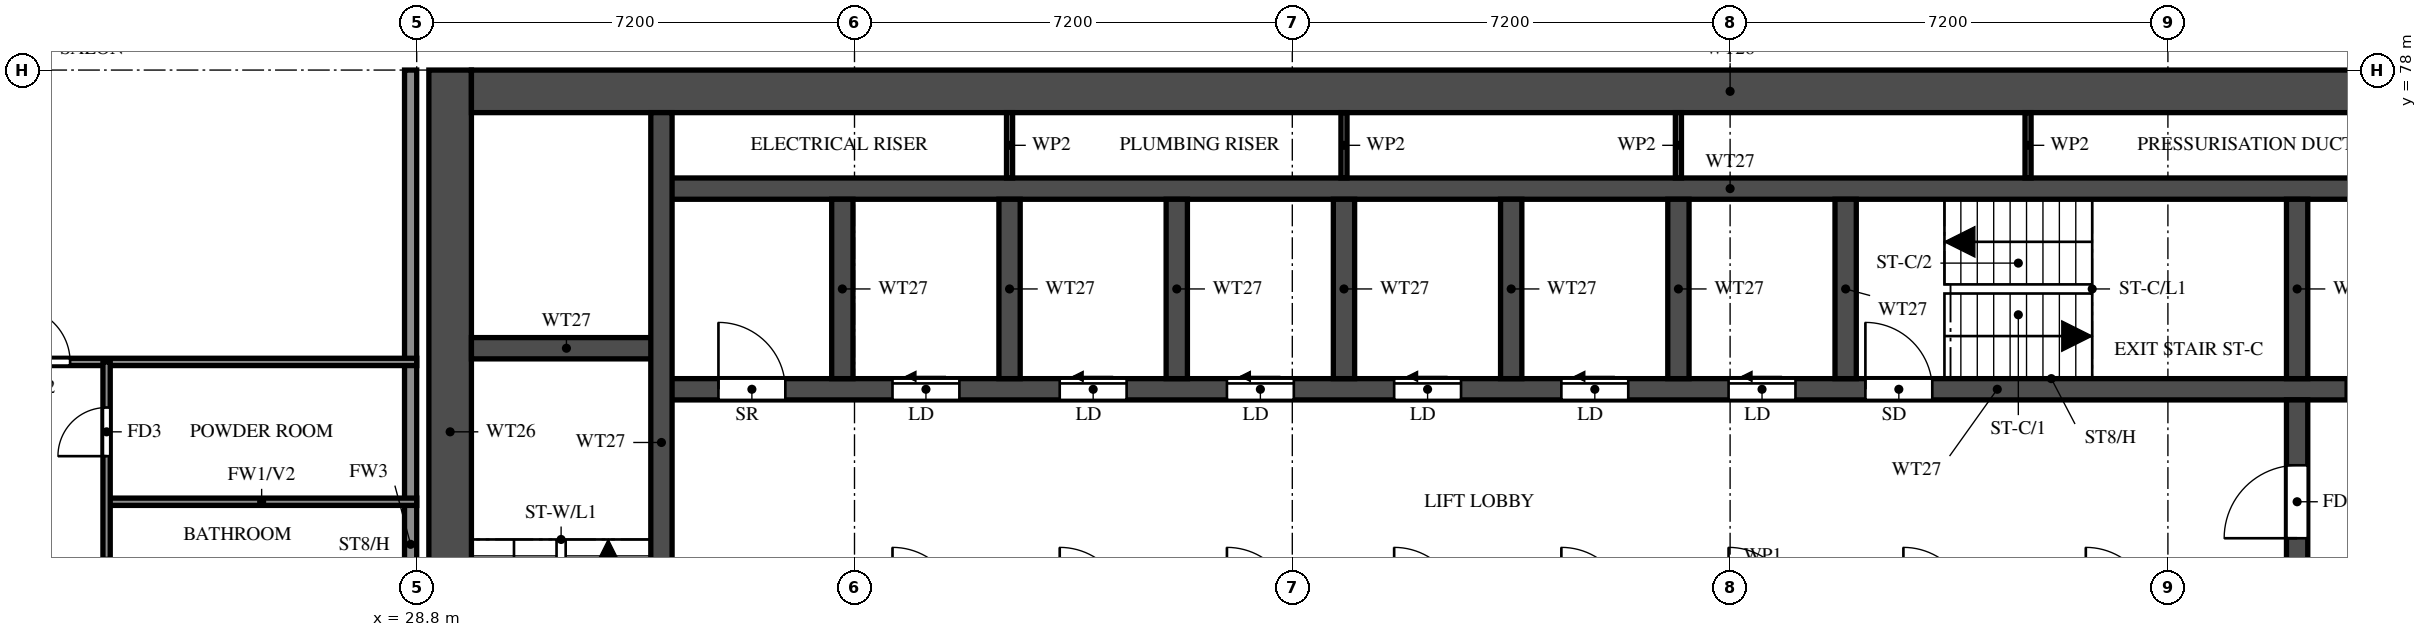
"""IFC4 building model, lengths in metres.
Left out: names, types, materials, properties, quantities, classifications, styles, units other than length and angle.
Written with IfcOpenShell. Run it as: python <this file> out.ifc"""

import sys

from ifc_helpers import new_model, si_unit, direction, frame, frame_2d, origin, place, context, subcontext, project, spatial, rectangle, extrude, element, fill, save


model = new_model("IFC4")
c1 = context("Model", 3, precision=1e-05, world=origin(), true_north=direction((0.0, 1.0)))
c2 = subcontext(c1, "Body", "Model", "MODEL_VIEW")
j1 = project(units=[si_unit("LENGTHUNIT", "METRE"), si_unit("PLANEANGLEUNIT", "RADIAN")], contexts=[c1])
p1 = place(None, origin())
s1 = spatial("IfcSite", under=j1, at=p1, CompositionType="ELEMENT")
p2 = place(p1, origin())
s2 = spatial("IfcBuilding", under=s1, at=p2, CompositionType="ELEMENT")
p3 = place(p2, frame((0.0, 0.0, 157.0)))
s3 = spatial("IfcBuildingStorey", under=s2, at=p3, CompositionType="ELEMENT", Elevation=157.0)
p4 = place(p3, frame((29.35, 66.1, 0.0), z_axis=(0.0, 0.0, 1.0), x_axis=(0.0, 1.0, 0.0)))
e1 = element("IfcWall", 1, at=p4, inside=s3, PredefinedType="SHEAR", context=c2, shape_type="SweptSolid", body=[
    extrude(rectangle(XDim=11.9, YDim=0.7, at=frame_2d((5.95, 0.0))), origin(), (0.0, 0.0, 1.0), 3.2),
])
p5 = place(p3, frame((29.7, 77.65, 0.0), z_axis=(0.0, 0.0, 1.0), x_axis=(1.0, 0.0, 0.0)))
e2 = element("IfcWall", 2, at=p5, inside=s3, PredefinedType="SHEAR", context=c2, shape_type="SweptSolid", body=[
    extrude(rectangle(XDim=41.4, YDim=0.7, at=frame_2d((20.7, 0.0))), origin(), (0.0, 0.0, 1.0), 3.2),
])
p6 = place(p3, frame((32.825, 72.75, 0.0), z_axis=(0.0, 0.0, 1.0), x_axis=(1.0, 0.0, 0.0)))
e3 = element("IfcWall", 3, at=p6, inside=s3, PredefinedType="SHEAR", context=c2, shape_type="SweptSolid", body=[
    extrude(rectangle(XDim=35.15, YDim=0.35, at=frame_2d((17.575, 0.0))), origin(), (0.0, 0.0, 1.0), 3.2),
])
p7 = place(p6, frame((19.8, 0.0, 0.0)))
e4 = element("IfcOpeningElement", 4, at=p7, cuts=e3, PredefinedType="OPENING", context=c2, shape_type="SweptSolid", body=[
    extrude(rectangle(XDim=1.1, YDim=2.1, at=frame_2d((0.55, 1.05))), frame((0.0, 0.185, 0.0), z_axis=(0.0, -1.0, 0.0), x_axis=(1.0, 0.0, 0.0)), (0.0, 0.0, 1.0), 0.37),
])
p8 = place(p6, frame((27.7, 0.0, 0.0)))
e5 = element("IfcOpeningElement", 5, at=p8, cuts=e3, PredefinedType="OPENING", context=c2, shape_type="SweptSolid", body=[
    extrude(rectangle(XDim=1.1, YDim=2.1, at=frame_2d((0.55, 1.05))), frame((0.0, 0.185, 0.0), z_axis=(0.0, -1.0, 0.0), x_axis=(1.0, 0.0, 0.0)), (0.0, 0.0, 1.0), 0.37),
])
p9 = place(p6, frame((30.3, 0.0, 0.0)))
e6 = element("IfcOpeningElement", 6, at=p9, cuts=e3, PredefinedType="OPENING", context=c2, shape_type="SweptSolid", body=[
    extrude(rectangle(XDim=1.1, YDim=2.1, at=frame_2d((0.55, 1.05))), frame((0.0, 0.185, 0.0), z_axis=(0.0, -1.0, 0.0), x_axis=(1.0, 0.0, 0.0)), (0.0, 0.0, 1.0), 0.37),
])
p10 = place(p6, frame((3.8, 0.0, 0.0)))
e7 = element("IfcOpeningElement", 7, at=p10, cuts=e3, PredefinedType="OPENING", context=c2, shape_type="SweptSolid", body=[
    extrude(rectangle(XDim=1.1, YDim=2.1, at=frame_2d((0.55, 1.05))), frame((0.0, 0.185, 0.0), z_axis=(0.0, -1.0, 0.0), x_axis=(1.0, 0.0, 0.0)), (0.0, 0.0, 1.0), 0.37),
])
p11 = place(p6, frame((6.55, 0.0, 0.0)))
e8 = element("IfcOpeningElement", 8, at=p11, cuts=e3, PredefinedType="OPENING", context=c2, shape_type="SweptSolid", body=[
    extrude(rectangle(XDim=1.1, YDim=2.1, at=frame_2d((0.55, 1.05))), frame((0.0, 0.185, 0.0), z_axis=(0.0, -1.0, 0.0), x_axis=(1.0, 0.0, 0.0)), (0.0, 0.0, 1.0), 0.37),
])
p12 = place(p6, frame((9.3, 0.0, 0.0)))
e9 = element("IfcOpeningElement", 9, at=p12, cuts=e3, PredefinedType="OPENING", context=c2, shape_type="SweptSolid", body=[
    extrude(rectangle(XDim=1.1, YDim=2.1, at=frame_2d((0.55, 1.05))), frame((0.0, 0.185, 0.0), z_axis=(0.0, -1.0, 0.0), x_axis=(1.0, 0.0, 0.0)), (0.0, 0.0, 1.0), 0.37),
])
p13 = place(p6, frame((12.05, 0.0, 0.0)))
e10 = element("IfcOpeningElement", 10, at=p13, cuts=e3, PredefinedType="OPENING", context=c2, shape_type="SweptSolid", body=[
    extrude(rectangle(XDim=1.1, YDim=2.1, at=frame_2d((0.55, 1.05))), frame((0.0, 0.185, 0.0), z_axis=(0.0, -1.0, 0.0), x_axis=(1.0, 0.0, 0.0)), (0.0, 0.0, 1.0), 0.37),
])
p14 = place(p6, frame((14.8, 0.0, 0.0)))
e11 = element("IfcOpeningElement", 11, at=p14, cuts=e3, PredefinedType="OPENING", context=c2, shape_type="SweptSolid", body=[
    extrude(rectangle(XDim=1.1, YDim=2.1, at=frame_2d((0.55, 1.05))), frame((0.0, 0.185, 0.0), z_axis=(0.0, -1.0, 0.0), x_axis=(1.0, 0.0, 0.0)), (0.0, 0.0, 1.0), 0.37),
])
p15 = place(p6, frame((17.55, 0.0, 0.0)))
e12 = element("IfcOpeningElement", 12, at=p15, cuts=e3, PredefinedType="OPENING", context=c2, shape_type="SweptSolid", body=[
    extrude(rectangle(XDim=1.1, YDim=2.1, at=frame_2d((0.55, 1.05))), frame((0.0, 0.185, 0.0), z_axis=(0.0, -1.0, 0.0), x_axis=(1.0, 0.0, 0.0)), (0.0, 0.0, 1.0), 0.37),
])
p16 = place(p6, frame((0.938, 0.0, 0.0)))
e13 = element("IfcOpeningElement", 13, at=p16, cuts=e3, PredefinedType="OPENING", context=c2, shape_type="SweptSolid", body=[
    extrude(rectangle(XDim=1.1, YDim=2.1, at=frame_2d((0.55, 1.05))), frame((0.0, 0.185, 0.0), z_axis=(0.0, -1.0, 0.0), x_axis=(1.0, 0.0, 0.0)), (0.0, 0.0, 1.0), 0.37),
])
p17 = place(p3, frame((32.825, 76.05, 0.0), z_axis=(0.0, 0.0, 1.0), x_axis=(1.0, 0.0, 0.0)))
e14 = element("IfcWall", 14, at=p17, inside=s3, PredefinedType="SHEAR", context=c2, shape_type="SweptSolid", body=[
    extrude(rectangle(XDim=35.15, YDim=0.35, at=frame_2d((17.575, 0.0))), origin(), (0.0, 0.0, 1.0), 3.2),
])
p18 = place(p3, frame((29.7, 73.425, 0.0), z_axis=(0.0, 0.0, 1.0), x_axis=(1.0, 0.0, 0.0)))
e15 = element("IfcWall", 15, at=p18, inside=s3, PredefinedType="SHEAR", context=c2, shape_type="SweptSolid", body=[
    extrude(rectangle(XDim=3.125, YDim=0.35, at=frame_2d((1.562, 0.0))), origin(), (0.0, 0.0, 1.0), 3.2),
])
p19 = place(p3, frame((32.825, 66.45, 0.0), z_axis=(0.0, 0.0, 1.0), x_axis=(0.0, 1.0, 0.0)))
e16 = element("IfcWall", 16, at=p19, inside=s3, PredefinedType="SHEAR", context=c2, shape_type="SweptSolid", body=[
    extrude(rectangle(XDim=10.85, YDim=0.35, at=frame_2d((5.425, 0.0))), origin(), (0.0, 0.0, 1.0), 3.2),
])
p20 = place(p3, frame((59.725, 66.45, 0.0), z_axis=(0.0, 0.0, 1.0), x_axis=(0.0, 1.0, 0.0)))
e17 = element("IfcWall", 17, at=p20, inside=s3, PredefinedType="SHEAR", context=c2, shape_type="SweptSolid", body=[
    extrude(rectangle(XDim=6.125, YDim=0.35, at=frame_2d((3.062, 0.0))), origin(), (0.0, 0.0, 1.0), 3.2),
])
p21 = place(p20, frame((3.85, 0.0, 0.0)))
e18 = element("IfcOpeningElement", 18, at=p21, cuts=e17, PredefinedType="OPENING", context=c2, shape_type="SweptSolid", body=[
    extrude(rectangle(XDim=1.2, YDim=2.1, at=frame_2d((0.6, 1.05))), frame((0.0, 0.185, 0.0), z_axis=(0.0, -1.0, 0.0), x_axis=(1.0, 0.0, 0.0)), (0.0, 0.0, 1.0), 0.37),
])
for number, where, z_axis, x_axis in (
    (19, (59.725, 72.925, 0.0), (0.0, 0.0, 1.0), (0.0, 1.0, 0.0)),
    (20, (35.8, 72.925, 0.0), (0.0, 0.0, 1.0), (0.0, 1.0, 0.0)),
    (21, (38.55, 72.925, 0.0), (0.0, 0.0, 1.0), (0.0, 1.0, 0.0)),
    (22, (41.3, 72.925, 0.0), (0.0, 0.0, 1.0), (0.0, 1.0, 0.0)),
    (23, (44.05, 72.925, 0.0), (0.0, 0.0, 1.0), (0.0, 1.0, 0.0)),
    (24, (46.8, 72.925, 0.0), (0.0, 0.0, 1.0), (0.0, 1.0, 0.0)),
    (25, (49.55, 72.925, 0.0), (0.0, 0.0, 1.0), (0.0, 1.0, 0.0)),
    (26, (52.3, 72.925, 0.0), (0.0, 0.0, 1.0), (0.0, 1.0, 0.0)),
):
    element("IfcWall", number, at=place(p3, frame(where, z_axis=z_axis, x_axis=x_axis)), inside=s3, PredefinedType="SHEAR", context=c2, shape_type="SweptSolid", body=[
        extrude(rectangle(XDim=2.95, YDim=0.35, at=frame_2d((1.475, 0.0))), origin(), (0.0, 0.0, 1.0), 3.2),
    ])
for number, where, z_axis, x_axis in (
    (27, (38.55, 76.225, 0.0), (0.0, 0.0, 1.0), (0.0, 1.0, 0.0)),
    (28, (44.05, 76.225, 0.0), (0.0, 0.0, 1.0), (0.0, 1.0, 0.0)),
    (29, (49.55, 76.225, 0.0), (0.0, 0.0, 1.0), (0.0, 1.0, 0.0)),
    (30, (55.3, 76.225, 0.0), (0.0, 0.0, 1.0), (0.0, 1.0, 0.0)),
):
    element("IfcWall", number, at=place(p3, frame(where, z_axis=z_axis, x_axis=x_axis)), inside=s3, PredefinedType="PARTITIONING", context=c2, shape_type="SweptSolid", body=[
        extrude(rectangle(XDim=1.075, YDim=0.1, at=frame_2d((0.538, 0.0))), origin(), (0.0, 0.0, 1.0), 3.2),
    ])
p22 = place(p3, frame((28.7, 62.4, 0.0), z_axis=(0.0, 0.0, 1.0), x_axis=(0.0, 1.0, 0.0)))
e31 = element("IfcWall", 31, at=p22, inside=s3, PredefinedType="SOLIDWALL", context=c2, shape_type="SweptSolid", body=[
    extrude(rectangle(XDim=15.6, YDim=0.2, at=frame_2d((7.8, 0.0))), origin(), (0.0, 0.0, 1.0), 3.2),
])
p23 = place(p3, frame((23.7, 70.9, 0.0), z_axis=(0.0, 0.0, 1.0), x_axis=(1.0, 0.0, 0.0)))
e32 = element("IfcWall", 32, at=p23, inside=s3, PredefinedType="PARTITIONING", context=c2, shape_type="SweptSolid", body=[
    extrude(rectangle(XDim=5.1, YDim=0.12, at=frame_2d((2.55, 0.0))), origin(), (0.0, 0.0, 1.0), 3.2),
])
p24 = place(p3, frame((14.525, 73.2, 0.0), z_axis=(0.0, 0.0, 1.0), x_axis=(1.0, 0.0, 0.0)))
e33 = element("IfcWall", 33, at=p24, inside=s3, PredefinedType="PARTITIONING", context=c2, shape_type="SweptSolid", body=[
    extrude(rectangle(XDim=14.275, YDim=0.12, at=frame_2d((7.138, 0.0))), origin(), (0.0, 0.0, 1.0), 2.3),
])
p25 = place(p24, frame((7.675, 0.0, 0.0)))
e34 = element("IfcOpeningElement", 34, at=p25, cuts=e33, PredefinedType="OPENING", context=c2, shape_type="SweptSolid", body=[
    extrude(rectangle(XDim=0.9, YDim=2.1, at=frame_2d((0.45, 1.05))), frame((0.0, 0.07, 0.0), z_axis=(0.0, -1.0, 0.0), x_axis=(1.0, 0.0, 0.0)), (0.0, 0.0, 1.0), 0.14),
])
p26 = place(p3, frame((23.7, 61.2, 0.0), z_axis=(0.0, 0.0, 1.0), x_axis=(0.0, 1.0, 0.0)))
e35 = element("IfcWall", 35, at=p26, inside=s3, PredefinedType="PARTITIONING", context=c2, shape_type="SweptSolid", body=[
    extrude(rectangle(XDim=12.0, YDim=0.12, at=frame_2d((6.0, 0.0))), origin(), (0.0, 0.0, 1.0), 3.2),
])
p27 = place(p26, frame((4.2, 0.0, 0.0)))
e36 = element("IfcOpeningElement", 36, at=p27, cuts=e35, PredefinedType="OPENING", context=c2, shape_type="SweptSolid", body=[
    extrude(rectangle(XDim=0.9, YDim=2.1, at=frame_2d((0.45, 1.05))), frame((0.0, 0.07, 0.0), z_axis=(0.0, -1.0, 0.0), x_axis=(1.0, 0.0, 0.0)), (0.0, 0.0, 1.0), 0.14),
])
p28 = place(p26, frame((7.975, 0.0, 0.0)))
e37 = element("IfcOpeningElement", 37, at=p28, cuts=e35, PredefinedType="OPENING", context=c2, shape_type="SweptSolid", body=[
    extrude(rectangle(XDim=0.8, YDim=2.1, at=frame_2d((0.4, 1.05))), frame((0.0, 0.07, 0.0), z_axis=(0.0, -1.0, 0.0), x_axis=(1.0, 0.0, 0.0)), (0.0, 0.0, 1.0), 0.14),
])
p29 = place(p26, frame((10.45, 0.0, 0.0)))
e38 = element("IfcOpeningElement", 38, at=p29, cuts=e35, PredefinedType="OPENING", context=c2, shape_type="SweptSolid", body=[
    extrude(rectangle(XDim=0.8, YDim=2.1, at=frame_2d((0.4, 1.05))), frame((0.0, 0.07, 0.0), z_axis=(0.0, -1.0, 0.0), x_axis=(1.0, 0.0, 0.0)), (0.0, 0.0, 1.0), 0.14),
])
p30 = place(p7, origin())
e39 = element("IfcDoor", 39, at=p30, inside=s3, OperationType="SINGLE_SWING_LEFT", PredefinedType="DOOR", context=c2, shape_type="SweptSolid", body=[
    extrude(rectangle(XDim=1.1, YDim=2.1, at=frame_2d((0.55, 1.05))), frame((0.0, 0.025, 0.0), z_axis=(0.0, -1.0, 0.0), x_axis=(1.0, 0.0, 0.0)), (0.0, 0.0, 1.0), 0.05),
])
fill(e4, e39)
p31 = place(p21, origin())
e40 = element("IfcDoor", 40, at=p31, inside=s3, OperationType="SINGLE_SWING_LEFT", PredefinedType="DOOR", context=c2, shape_type="SweptSolid", body=[
    extrude(rectangle(XDim=1.2, YDim=2.1, at=frame_2d((0.6, 1.05))), frame((0.0, 0.025, 0.0), z_axis=(0.0, -1.0, 0.0), x_axis=(1.0, 0.0, 0.0)), (0.0, 0.0, 1.0), 0.05),
])
fill(e18, e40)
p32 = place(p8, origin())
e41 = element("IfcDoor", 41, at=p32, inside=s3, OperationType="SLIDING_TO_LEFT", PredefinedType="DOOR", context=c2, shape_type="SweptSolid", body=[
    extrude(rectangle(XDim=1.1, YDim=2.1, at=frame_2d((0.55, 1.05))), frame((0.0, 0.025, 0.0), z_axis=(0.0, -1.0, 0.0), x_axis=(1.0, 0.0, 0.0)), (0.0, 0.0, 1.0), 0.05),
])
fill(e5, e41)
p33 = place(p10, origin())
e42 = element("IfcDoor", 42, at=p33, inside=s3, OperationType="SLIDING_TO_LEFT", PredefinedType="DOOR", context=c2, shape_type="SweptSolid", body=[
    extrude(rectangle(XDim=1.1, YDim=2.1, at=frame_2d((0.55, 1.05))), frame((0.0, 0.025, 0.0), z_axis=(0.0, -1.0, 0.0), x_axis=(1.0, 0.0, 0.0)), (0.0, 0.0, 1.0), 0.05),
])
fill(e7, e42)
p34 = place(p11, origin())
e43 = element("IfcDoor", 43, at=p34, inside=s3, OperationType="SLIDING_TO_LEFT", PredefinedType="DOOR", context=c2, shape_type="SweptSolid", body=[
    extrude(rectangle(XDim=1.1, YDim=2.1, at=frame_2d((0.55, 1.05))), frame((0.0, 0.025, 0.0), z_axis=(0.0, -1.0, 0.0), x_axis=(1.0, 0.0, 0.0)), (0.0, 0.0, 1.0), 0.05),
])
fill(e8, e43)
p35 = place(p12, origin())
e44 = element("IfcDoor", 44, at=p35, inside=s3, OperationType="SLIDING_TO_LEFT", PredefinedType="DOOR", context=c2, shape_type="SweptSolid", body=[
    extrude(rectangle(XDim=1.1, YDim=2.1, at=frame_2d((0.55, 1.05))), frame((0.0, 0.025, 0.0), z_axis=(0.0, -1.0, 0.0), x_axis=(1.0, 0.0, 0.0)), (0.0, 0.0, 1.0), 0.05),
])
fill(e9, e44)
p36 = place(p13, origin())
e45 = element("IfcDoor", 45, at=p36, inside=s3, OperationType="SLIDING_TO_LEFT", PredefinedType="DOOR", context=c2, shape_type="SweptSolid", body=[
    extrude(rectangle(XDim=1.1, YDim=2.1, at=frame_2d((0.55, 1.05))), frame((0.0, 0.025, 0.0), z_axis=(0.0, -1.0, 0.0), x_axis=(1.0, 0.0, 0.0)), (0.0, 0.0, 1.0), 0.05),
])
fill(e10, e45)
p37 = place(p14, origin())
e46 = element("IfcDoor", 46, at=p37, inside=s3, OperationType="SLIDING_TO_LEFT", PredefinedType="DOOR", context=c2, shape_type="SweptSolid", body=[
    extrude(rectangle(XDim=1.1, YDim=2.1, at=frame_2d((0.55, 1.05))), frame((0.0, 0.025, 0.0), z_axis=(0.0, -1.0, 0.0), x_axis=(1.0, 0.0, 0.0)), (0.0, 0.0, 1.0), 0.05),
])
fill(e11, e46)
p38 = place(p15, origin())
e47 = element("IfcDoor", 47, at=p38, inside=s3, OperationType="SLIDING_TO_LEFT", PredefinedType="DOOR", context=c2, shape_type="SweptSolid", body=[
    extrude(rectangle(XDim=1.1, YDim=2.1, at=frame_2d((0.55, 1.05))), frame((0.0, 0.025, 0.0), z_axis=(0.0, -1.0, 0.0), x_axis=(1.0, 0.0, 0.0)), (0.0, 0.0, 1.0), 0.05),
])
fill(e12, e47)
p39 = place(p16, origin())
e48 = element("IfcDoor", 48, at=p39, inside=s3, OperationType="SINGLE_SWING_LEFT", PredefinedType="DOOR", context=c2, shape_type="SweptSolid", body=[
    extrude(rectangle(XDim=1.1, YDim=2.1, at=frame_2d((0.55, 1.05))), frame((0.0, 0.025, 0.0), z_axis=(0.0, -1.0, 0.0), x_axis=(1.0, 0.0, 0.0)), (0.0, 0.0, 1.0), 0.05),
])
fill(e13, e48)
p40 = place(p25, origin())
e49 = element("IfcDoor", 49, at=p40, inside=s3, OperationType="SINGLE_SWING_RIGHT", PredefinedType="DOOR", context=c2, shape_type="SweptSolid", body=[
    extrude(rectangle(XDim=0.9, YDim=2.1, at=frame_2d((0.45, 1.05))), frame((0.0, 0.025, 0.0), z_axis=(0.0, -1.0, 0.0), x_axis=(1.0, 0.0, 0.0)), (0.0, 0.0, 1.0), 0.05),
])
fill(e34, e49)
p41 = place(p29, origin())
e50 = element("IfcDoor", 50, at=p41, inside=s3, OperationType="SINGLE_SWING_LEFT", PredefinedType="DOOR", context=c2, shape_type="SweptSolid", body=[
    extrude(rectangle(XDim=0.8, YDim=2.1, at=frame_2d((0.4, 1.05))), frame((0.0, 0.025, 0.0), z_axis=(0.0, -1.0, 0.0), x_axis=(1.0, 0.0, 0.0)), (0.0, 0.0, 1.0), 0.05),
])
fill(e38, e50)
save(model, sys.argv[1])
